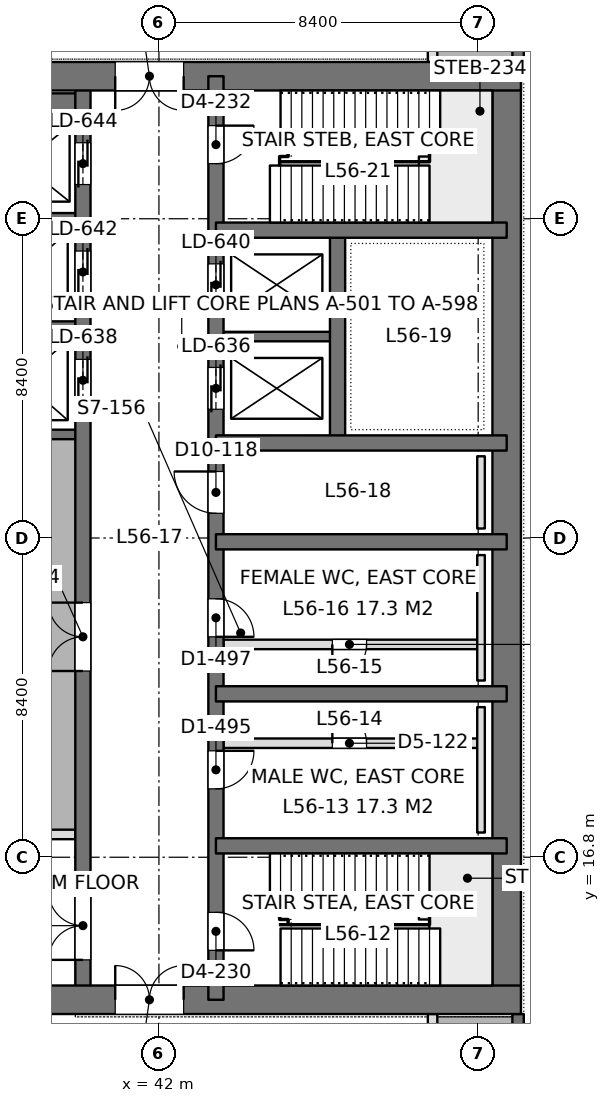
"""IFC4 building model, lengths in metres.
Left out: names, types, materials, properties, quantities, classifications, styles, units other than length and angle.
Written with IfcOpenShell. Run it as: python <this file> out.ifc"""

import sys

from ifc_helpers import new_model, si_unit, direction, frame, frame_2d, origin, place, context, subcontext, project, spatial, rectangle, extrude, element, fill, save


model = new_model("IFC4")
c1 = context("Model", 3, precision=1e-05, world=origin(), true_north=direction((0.0, 1.0)))
c2 = subcontext(c1, "Body", "Model", "MODEL_VIEW")
j1 = project(units=[si_unit("LENGTHUNIT", "METRE"), si_unit("PLANEANGLEUNIT", "RADIAN")], contexts=[c1])
p1 = place(None, origin())
s1 = spatial("IfcSite", under=j1, at=p1, CompositionType="ELEMENT")
p2 = place(p1, origin())
s2 = spatial("IfcBuilding", under=s1, at=p2, CompositionType="ELEMENT")
p3 = place(p2, frame((0.0, 0.0, 244.8)))
s3 = spatial("IfcBuildingStorey", under=s2, at=p3, CompositionType="ELEMENT", Elevation=244.8)
p4 = place(p3, frame((33.675, 13.05, 0.0), z_axis=(0.0, 0.0, 1.0), x_axis=(1.0, 0.0, 0.0)))
e1 = element("IfcWall", 1, at=p4, inside=s3, PredefinedType="SHEAR", context=c2, shape_type="SweptSolid", body=[
    extrude(rectangle(XDim=17.85, YDim=0.75, at=frame_2d((8.925, 0.0))), origin(), (0.0, 0.0, 1.0), 5.4),
])
p5 = place(p4, frame((7.175, 0.0, 0.0)))
e2 = element("IfcOpeningElement", 2, at=p5, cuts=e1, PredefinedType="OPENING", context=c2, shape_type="SweptSolid", body=[
    extrude(rectangle(XDim=1.8, YDim=2.4, at=frame_2d((0.9, 1.2))), frame((0.0, 0.385, 0.0), z_axis=(0.0, -1.0, 0.0), x_axis=(1.0, 0.0, 0.0)), (0.0, 0.0, 1.0), 0.77),
])
p6 = place(p3, frame((33.675, 37.35, 0.0), z_axis=(0.0, 0.0, 1.0), x_axis=(1.0, 0.0, 0.0)))
e3 = element("IfcWall", 3, at=p6, inside=s3, PredefinedType="SHEAR", context=c2, shape_type="SweptSolid", body=[
    extrude(rectangle(XDim=17.85, YDim=0.75, at=frame_2d((8.925, 0.0))), origin(), (0.0, 0.0, 1.0), 5.4),
])
p7 = place(p6, frame((7.175, 0.0, 0.0)))
e4 = element("IfcOpeningElement", 4, at=p7, cuts=e3, PredefinedType="OPENING", context=c2, shape_type="SweptSolid", body=[
    extrude(rectangle(XDim=1.8, YDim=2.4, at=frame_2d((0.9, 1.2))), frame((0.0, 0.385, 0.0), z_axis=(0.0, -1.0, 0.0), x_axis=(1.0, 0.0, 0.0)), (0.0, 0.0, 1.0), 0.77),
])
p8 = place(p3, frame((51.15, 13.05, 0.0), z_axis=(0.0, 0.0, 1.0), x_axis=(0.0, 1.0, 0.0)))
e5 = element("IfcWall", 5, at=p8, inside=s3, PredefinedType="SHEAR", context=c2, shape_type="SweptSolid", body=[
    extrude(rectangle(XDim=24.3, YDim=0.75, at=frame_2d((12.15, 0.0))), origin(), (0.0, 0.0, 1.0), 5.4),
])
p9 = place(p3, frame((43.5, 13.05, 0.0), z_axis=(0.0, 0.0, 1.0), x_axis=(0.0, 1.0, 0.0)))
e6 = element("IfcWall", 6, at=p9, inside=s3, PredefinedType="SHEAR", context=c2, shape_type="SweptSolid", body=[
    extrude(rectangle(XDim=24.3, YDim=0.4, at=frame_2d((12.15, 0.0))), origin(), (0.0, 0.0, 1.0), 5.4),
])
p10 = place(p9, frame((1.3, 0.0, 0.0)))
e7 = element("IfcOpeningElement", 7, at=p10, cuts=e6, PredefinedType="OPENING", context=c2, shape_type="SweptSolid", body=[
    extrude(rectangle(XDim=1.0, YDim=2.2, at=frame_2d((0.5, 1.1))), frame((0.0, 0.21, 0.0), z_axis=(0.0, -1.0, 0.0), x_axis=(1.0, 0.0, 0.0)), (0.0, 0.0, 1.0), 0.42),
])
p11 = place(p9, frame((22.0, 0.0, 0.0)))
e8 = element("IfcOpeningElement", 8, at=p11, cuts=e6, PredefinedType="OPENING", context=c2, shape_type="SweptSolid", body=[
    extrude(rectangle(XDim=1.0, YDim=2.2, at=frame_2d((0.5, 1.1))), frame((0.0, 0.21, 0.0), z_axis=(0.0, -1.0, 0.0), x_axis=(1.0, 0.0, 0.0)), (0.0, 0.0, 1.0), 0.42),
])
p12 = place(p9, frame((5.55, 0.0, 0.0)))
e9 = element("IfcOpeningElement", 9, at=p12, cuts=e6, PredefinedType="OPENING", context=c2, shape_type="SweptSolid", body=[
    extrude(rectangle(XDim=1.0, YDim=2.2, at=frame_2d((0.5, 1.1))), frame((0.0, 0.21, 0.0), z_axis=(0.0, -1.0, 0.0), x_axis=(1.0, 0.0, 0.0)), (0.0, 0.0, 1.0), 0.42),
])
p13 = place(p9, frame((9.55, 0.0, 0.0)))
e10 = element("IfcOpeningElement", 10, at=p13, cuts=e6, PredefinedType="OPENING", context=c2, shape_type="SweptSolid", body=[
    extrude(rectangle(XDim=1.0, YDim=2.2, at=frame_2d((0.5, 1.1))), frame((0.0, 0.21, 0.0), z_axis=(0.0, -1.0, 0.0), x_axis=(1.0, 0.0, 0.0)), (0.0, 0.0, 1.0), 0.42),
])
p14 = place(p9, frame((12.8, 0.0, 0.0)))
e11 = element("IfcOpeningElement", 11, at=p14, cuts=e6, PredefinedType="OPENING", context=c2, shape_type="SweptSolid", body=[
    extrude(rectangle(XDim=1.1, YDim=2.2, at=frame_2d((0.55, 1.1))), frame((0.0, 0.21, 0.0), z_axis=(0.0, -1.0, 0.0), x_axis=(1.0, 0.0, 0.0)), (0.0, 0.0, 1.0), 0.42),
])
p15 = place(p9, frame((15.538, 0.0, 0.0)))
e12 = element("IfcOpeningElement", 12, at=p15, cuts=e6, PredefinedType="OPENING", context=c2, shape_type="SweptSolid", body=[
    extrude(rectangle(XDim=1.1, YDim=2.2, at=frame_2d((0.55, 1.1))), frame((0.0, 0.21, 0.0), z_axis=(0.0, -1.0, 0.0), x_axis=(1.0, 0.0, 0.0)), (0.0, 0.0, 1.0), 0.42),
])
p16 = place(p9, frame((18.262, 0.0, 0.0)))
e13 = element("IfcOpeningElement", 13, at=p16, cuts=e6, PredefinedType="OPENING", context=c2, shape_type="SweptSolid", body=[
    extrude(rectangle(XDim=1.1, YDim=2.2, at=frame_2d((0.55, 1.1))), frame((0.0, 0.21, 0.0), z_axis=(0.0, -1.0, 0.0), x_axis=(1.0, 0.0, 0.0)), (0.0, 0.0, 1.0), 0.42),
])
p17 = place(p3, frame((40.0, 13.05, 0.0), z_axis=(0.0, 0.0, 1.0), x_axis=(0.0, 1.0, 0.0)))
e14 = element("IfcWall", 14, at=p17, inside=s3, PredefinedType="SHEAR", context=c2, shape_type="SweptSolid", body=[
    extrude(rectangle(XDim=24.3, YDim=0.4, at=frame_2d((12.15, 0.0))), origin(), (0.0, 0.0, 1.0), 5.4),
])
p18 = place(p17, frame((15.75, 0.0, 0.0)))
e15 = element("IfcOpeningElement", 15, at=p18, cuts=e14, PredefinedType="OPENING", context=c2, shape_type="SweptSolid", body=[
    extrude(rectangle(XDim=1.1, YDim=2.2, at=frame_2d((0.55, 1.1))), frame((0.0, 0.21, 0.0), z_axis=(0.0, -1.0, 0.0), x_axis=(1.0, 0.0, 0.0)), (0.0, 0.0, 1.0), 0.42),
])
p19 = place(p17, frame((18.6, 0.0, 0.0)))
e16 = element("IfcOpeningElement", 16, at=p19, cuts=e14, PredefinedType="OPENING", context=c2, shape_type="SweptSolid", body=[
    extrude(rectangle(XDim=1.1, YDim=2.2, at=frame_2d((0.55, 1.1))), frame((0.0, 0.21, 0.0), z_axis=(0.0, -1.0, 0.0), x_axis=(1.0, 0.0, 0.0)), (0.0, 0.0, 1.0), 0.42),
])
p20 = place(p17, frame((21.45, 0.0, 0.0)))
e17 = element("IfcOpeningElement", 17, at=p20, cuts=e14, PredefinedType="OPENING", context=c2, shape_type="SweptSolid", body=[
    extrude(rectangle(XDim=1.1, YDim=2.2, at=frame_2d((0.55, 1.1))), frame((0.0, 0.21, 0.0), z_axis=(0.0, -1.0, 0.0), x_axis=(1.0, 0.0, 0.0)), (0.0, 0.0, 1.0), 0.42),
])
p21 = place(p17, frame((8.65, 0.0, 0.0)))
e18 = element("IfcOpeningElement", 18, at=p21, cuts=e14, PredefinedType="OPENING", context=c2, shape_type="SweptSolid", body=[
    extrude(rectangle(XDim=1.8, YDim=2.4, at=frame_2d((0.9, 1.2))), frame((0.0, 0.21, 0.0), z_axis=(0.0, -1.0, 0.0), x_axis=(1.0, 0.0, 0.0)), (0.0, 0.0, 1.0), 0.42),
])
p22 = place(p17, frame((1.05, 0.0, 0.0)))
e19 = element("IfcOpeningElement", 19, at=p22, cuts=e14, PredefinedType="OPENING", context=c2, shape_type="SweptSolid", body=[
    extrude(rectangle(XDim=1.8, YDim=2.4, at=frame_2d((0.9, 1.2))), frame((0.0, 0.21, 0.0), z_axis=(0.0, -1.0, 0.0), x_axis=(1.0, 0.0, 0.0)), (0.0, 0.0, 1.0), 0.42),
])
for number, where, z_axis, x_axis in (
    (20, (51.15, 17.1, 0.0), (0.0, 0.0, 1.0), (-1.0, 0.0, 0.0)),
    (21, (51.15, 21.1, 0.0), (0.0, 0.0, 1.0), (-1.0, 0.0, 0.0)),
    (22, (51.15, 25.1, 0.0), (0.0, 0.0, 1.0), (-1.0, 0.0, 0.0)),
    (23, (51.15, 27.7, 0.0), (0.0, 0.0, 1.0), (-1.0, 0.0, 0.0)),
    (24, (51.15, 33.3, 0.0), (0.0, 0.0, 1.0), (-1.0, 0.0, 0.0)),
):
    element("IfcWall", number, at=place(p3, frame(where, z_axis=z_axis, x_axis=x_axis)), inside=s3, PredefinedType="SHEAR", context=c2, shape_type="SweptSolid", body=[
        extrude(rectangle(XDim=7.65, YDim=0.4, at=frame_2d((3.825, 0.0))), origin(), (0.0, 0.0, 1.0), 5.4),
    ])
p23 = place(p3, frame((46.7, 27.7, 0.0), z_axis=(0.0, 0.0, 1.0), x_axis=(0.0, 1.0, 0.0)))
e25 = element("IfcWall", 25, at=p23, inside=s3, PredefinedType="SHEAR", context=c2, shape_type="SweptSolid", body=[
    extrude(rectangle(XDim=5.6, YDim=0.4, at=frame_2d((2.8, 0.0))), origin(), (0.0, 0.0, 1.0), 5.4),
])
p24 = place(p3, frame((46.7, 30.5, 0.0), z_axis=(0.0, 0.0, 1.0), x_axis=(-1.0, 0.0, 0.0)))
e26 = element("IfcWall", 26, at=p24, inside=s3, PredefinedType="SHEAR", context=c2, shape_type="SweptSolid", body=[
    extrude(rectangle(XDim=3.2, YDim=0.25, at=frame_2d((1.6, 0.0))), origin(), (0.0, 0.0, 1.0), 5.4),
])
p25 = place(p3, frame((40.0, 27.925, 0.0), z_axis=(0.0, 0.0, 1.0), x_axis=(-1.0, 0.0, 0.0)))
e27 = element("IfcWall", 27, at=p25, inside=s3, PredefinedType="SHEAR", context=c2, shape_type="SweptSolid", body=[
    extrude(rectangle(XDim=5.95, YDim=0.25, at=frame_2d((2.975, 0.0))), origin(), (0.0, 0.0, 1.0), 5.4),
])
for number, where, z_axis, x_axis in (
    (28, (40.0, 30.775, 0.0), (0.0, 0.0, 1.0), (-1.0, 0.0, 0.0)),
    (29, (40.0, 33.625, 0.0), (0.0, 0.0, 1.0), (-1.0, 0.0, 0.0)),
):
    element("IfcWall", number, at=place(p3, frame(where, z_axis=z_axis, x_axis=x_axis)), inside=s3, PredefinedType="SHEAR", context=c2, shape_type="SweptSolid", body=[
        extrude(rectangle(XDim=3.2, YDim=0.25, at=frame_2d((1.6, 0.0))), origin(), (0.0, 0.0, 1.0), 5.4),
    ])
p26 = place(p3, frame((40.0, 36.625, 0.0), z_axis=(0.0, 0.0, 1.0), x_axis=(-1.0, 0.0, 0.0)))
e30 = element("IfcWall", 30, at=p26, inside=s3, PredefinedType="SHEAR", context=c2, shape_type="SweptSolid", body=[
    extrude(rectangle(XDim=3.2, YDim=0.55, at=frame_2d((1.6, 0.0))), origin(), (0.0, 0.0, 1.0), 5.4),
])
p27 = place(p3, frame((51.45, 42.0, 0.0), z_axis=(0.0, 0.0, 1.0), x_axis=(0.0, -1.0, 0.0)))
e31 = element("IfcWall", 31, at=p27, inside=s3, PredefinedType="SOLIDWALL", context=c2, shape_type="SweptSolid", body=[
    extrude(rectangle(XDim=4.275, YDim=0.3, at=frame_2d((2.137, 0.0))), origin(), (0.0, 0.0, 1.0), 5.25),
])
p28 = place(p27, frame((0.938, 0.0, 1.2)))
e32 = element("IfcOpeningElement", 32, at=p28, cuts=e31, PredefinedType="OPENING", context=c2, shape_type="SweptSolid", body=[
    extrude(rectangle(XDim=2.4, YDim=2.4, at=frame_2d((1.2, 1.2))), frame((0.0, 0.16, 0.0), z_axis=(0.0, -1.0, 0.0), x_axis=(1.0, 0.0, 0.0)), (0.0, 0.0, 1.0), 0.32),
])
p29 = place(p3, frame((51.45, 12.675, 0.0), z_axis=(0.0, 0.0, 1.0), x_axis=(0.0, -1.0, 0.0)))
e33 = element("IfcWall", 33, at=p29, inside=s3, PredefinedType="SOLIDWALL", context=c2, shape_type="SweptSolid", body=[
    extrude(rectangle(XDim=4.275, YDim=0.3, at=frame_2d((2.138, 0.0))), origin(), (0.0, 0.0, 1.0), 5.25),
])
p30 = place(p29, frame((0.938, 0.0, 1.2)))
e34 = element("IfcOpeningElement", 34, at=p30, cuts=e33, PredefinedType="OPENING", context=c2, shape_type="SweptSolid", body=[
    extrude(rectangle(XDim=2.4, YDim=2.4, at=frame_2d((1.2, 1.2))), frame((0.0, 0.16, 0.0), z_axis=(0.0, -1.0, 0.0), x_axis=(1.0, 0.0, 0.0)), (0.0, 0.0, 1.0), 0.32),
])
p31 = place(p3, frame((33.898, 17.4, 0.0), z_axis=(0.0, 0.0, 1.0), x_axis=(1.0, 0.0, 0.0)))
e35 = element("IfcWall", 35, at=p31, inside=s3, PredefinedType="PARTITIONING", context=c2, shape_type="SweptSolid", body=[
    extrude(rectangle(XDim=5.904, YDim=0.25, at=frame_2d((2.952, 0.0))), origin(), (0.0, 0.0, 1.0), 4.7),
])
for number, where, z_axis, x_axis in (
    (36, (49.2, 10.8, 0.0), (0.0, 0.0, 1.0), (0.0, 1.0, 0.0)),
    (37, (49.2, 37.724, 0.0), (0.0, 0.0, 1.0), (0.0, 1.0, 0.0)),
):
    element("IfcWall", number, at=place(p3, frame(where, z_axis=z_axis, x_axis=x_axis)), inside=s3, PredefinedType="PARTITIONING", context=c2, shape_type="SweptSolid", body=[
        extrude(rectangle(XDim=1.876, YDim=0.25, at=frame_2d((0.938, 0.0))), origin(), (0.0, 0.0, 1.0), 5.25),
    ])
p32 = place(p3, frame((43.7, 22.4, 0.0), z_axis=(0.0, 0.0, 1.0), x_axis=(1.0, 0.0, 0.0)))
e38 = element("IfcWall", 38, at=p32, inside=s3, PredefinedType="PARTITIONING", context=c2, shape_type="SweptSolid", body=[
    extrude(rectangle(XDim=6.675, YDim=0.25, at=frame_2d((3.337, 0.0))), origin(), (0.0, 0.0, 1.0), 5.2),
])
p33 = place(p32, frame((2.863, 0.0, 0.0)))
e39 = element("IfcOpeningElement", 39, at=p33, cuts=e38, PredefinedType="OPENING", context=c2, shape_type="SweptSolid", body=[
    extrude(rectangle(XDim=0.9, YDim=2.2, at=frame_2d((0.45, 1.1))), frame((0.0, 0.135, 0.0), z_axis=(0.0, -1.0, 0.0), x_axis=(1.0, 0.0, 0.0)), (0.0, 0.0, 1.0), 0.27),
])
p34 = place(p3, frame((43.7, 19.8, 0.0), z_axis=(0.0, 0.0, 1.0), x_axis=(1.0, 0.0, 0.0)))
e40 = element("IfcWall", 40, at=p34, inside=s3, PredefinedType="PARTITIONING", context=c2, shape_type="SweptSolid", body=[
    extrude(rectangle(XDim=6.675, YDim=0.25, at=frame_2d((3.337, 0.0))), origin(), (0.0, 0.0, 1.0), 5.2),
])
p35 = place(p34, frame((2.863, 0.0, 0.0)))
e41 = element("IfcOpeningElement", 41, at=p35, cuts=e40, PredefinedType="OPENING", context=c2, shape_type="SweptSolid", body=[
    extrude(rectangle(XDim=0.9, YDim=2.2, at=frame_2d((0.45, 1.1))), frame((0.0, 0.135, 0.0), z_axis=(0.0, -1.0, 0.0), x_axis=(1.0, 0.0, 0.0)), (0.0, 0.0, 1.0), 0.27),
])
for number, where, z_axis, x_axis in (
    (42, (50.475, 17.45, 0.0), (0.0, 0.0, 1.0), (0.0, 1.0, 0.0)),
    (43, (50.475, 21.45, 0.0), (0.0, 0.0, 1.0), (0.0, 1.0, 0.0)),
):
    element("IfcWall", number, at=place(p3, frame(where, z_axis=z_axis, x_axis=x_axis)), inside=s3, PredefinedType="PLUMBINGWALL", context=c2, shape_type="SweptSolid", body=[
        extrude(rectangle(XDim=3.3, YDim=0.2, at=frame_2d((1.65, 0.0))), origin(), (0.0, 0.0, 1.0), 1.2),
    ])
p36 = place(p3, frame((50.475, 25.45, 0.0), z_axis=(0.0, 0.0, 1.0), x_axis=(0.0, 1.0, 0.0)))
e44 = element("IfcWall", 44, at=p36, inside=s3, PredefinedType="PLUMBINGWALL", context=c2, shape_type="SweptSolid", body=[
    extrude(rectangle(XDim=1.9, YDim=0.2, at=frame_2d((0.95, 0.0))), origin(), (0.0, 0.0, 1.0), 1.2),
])
p37 = place(p5, origin())
e45 = element("IfcDoor", 45, at=p37, inside=s3, OperationType="DOUBLE_DOOR_SINGLE_SWING", PredefinedType="DOOR", context=c2, shape_type="SweptSolid", body=[
    extrude(rectangle(XDim=1.8, YDim=2.4, at=frame_2d((0.9, 1.2))), frame((0.0, 0.025, 0.0), z_axis=(0.0, -1.0, 0.0), x_axis=(1.0, 0.0, 0.0)), (0.0, 0.0, 1.0), 0.05),
])
fill(e2, e45)
p38 = place(p7, frame((1.8, 0.0, 0.0), z_axis=(0.0, 0.0, 1.0), x_axis=(-1.0, 0.0, 0.0)))
e46 = element("IfcDoor", 46, at=p38, inside=s3, OperationType="DOUBLE_DOOR_SINGLE_SWING", PredefinedType="DOOR", context=c2, shape_type="SweptSolid", body=[
    extrude(rectangle(XDim=1.8, YDim=2.4, at=frame_2d((0.9, 1.2))), frame((0.0, 0.025, 0.0), z_axis=(0.0, -1.0, 0.0), x_axis=(1.0, 0.0, 0.0)), (0.0, 0.0, 1.0), 0.05),
])
fill(e4, e46)
p39 = place(p10, frame((1.0, 0.0, 0.0), z_axis=(0.0, 0.0, 1.0), x_axis=(-1.0, 0.0, 0.0)))
e47 = element("IfcDoor", 47, at=p39, inside=s3, OperationType="SINGLE_SWING_RIGHT", PredefinedType="DOOR", context=c2, shape_type="SweptSolid", body=[
    extrude(rectangle(XDim=1.0, YDim=2.2, at=frame_2d((0.5, 1.1))), frame((0.0, 0.025, 0.0), z_axis=(0.0, -1.0, 0.0), x_axis=(1.0, 0.0, 0.0)), (0.0, 0.0, 1.0), 0.05),
])
fill(e7, e47)
p40 = place(p11, frame((1.0, 0.0, 0.0), z_axis=(0.0, 0.0, 1.0), x_axis=(-1.0, 0.0, 0.0)))
e48 = element("IfcDoor", 48, at=p40, inside=s3, OperationType="SINGLE_SWING_LEFT", PredefinedType="DOOR", context=c2, shape_type="SweptSolid", body=[
    extrude(rectangle(XDim=1.0, YDim=2.2, at=frame_2d((0.5, 1.1))), frame((0.0, 0.025, 0.0), z_axis=(0.0, -1.0, 0.0), x_axis=(1.0, 0.0, 0.0)), (0.0, 0.0, 1.0), 0.05),
])
fill(e8, e48)
p41 = place(p12, frame((1.0, 0.0, 0.0), z_axis=(0.0, 0.0, 1.0), x_axis=(-1.0, 0.0, 0.0)))
e49 = element("IfcDoor", 49, at=p41, inside=s3, OperationType="SINGLE_SWING_LEFT", PredefinedType="DOOR", context=c2, shape_type="SweptSolid", body=[
    extrude(rectangle(XDim=1.0, YDim=2.2, at=frame_2d((0.5, 1.1))), frame((0.0, 0.025, 0.0), z_axis=(0.0, -1.0, 0.0), x_axis=(1.0, 0.0, 0.0)), (0.0, 0.0, 1.0), 0.05),
])
fill(e9, e49)
p42 = place(p13, frame((1.0, 0.0, 0.0), z_axis=(0.0, 0.0, 1.0), x_axis=(-1.0, 0.0, 0.0)))
e50 = element("IfcDoor", 50, at=p42, inside=s3, OperationType="SINGLE_SWING_RIGHT", PredefinedType="DOOR", context=c2, shape_type="SweptSolid", body=[
    extrude(rectangle(XDim=1.0, YDim=2.2, at=frame_2d((0.5, 1.1))), frame((0.0, 0.025, 0.0), z_axis=(0.0, -1.0, 0.0), x_axis=(1.0, 0.0, 0.0)), (0.0, 0.0, 1.0), 0.05),
])
fill(e10, e50)
p43 = place(p14, origin())
e51 = element("IfcDoor", 51, at=p43, inside=s3, OperationType="SINGLE_SWING_RIGHT", PredefinedType="DOOR", context=c2, shape_type="SweptSolid", body=[
    extrude(rectangle(XDim=1.1, YDim=2.2, at=frame_2d((0.55, 1.1))), frame((0.0, 0.025, 0.0), z_axis=(0.0, -1.0, 0.0), x_axis=(1.0, 0.0, 0.0)), (0.0, 0.0, 1.0), 0.05),
])
fill(e11, e51)
p44 = place(p18, origin())
e52 = element("IfcDoor", 52, at=p44, inside=s3, OperationType="DOUBLE_DOOR_SLIDING", PredefinedType="DOOR", context=c2, shape_type="SweptSolid", body=[
    extrude(rectangle(XDim=1.1, YDim=2.2, at=frame_2d((0.55, 1.1))), frame((0.0, 0.025, 0.0), z_axis=(0.0, -1.0, 0.0), x_axis=(1.0, 0.0, 0.0)), (0.0, 0.0, 1.0), 0.05),
])
fill(e15, e52)
p45 = place(p19, origin())
e53 = element("IfcDoor", 53, at=p45, inside=s3, OperationType="DOUBLE_DOOR_SLIDING", PredefinedType="DOOR", context=c2, shape_type="SweptSolid", body=[
    extrude(rectangle(XDim=1.1, YDim=2.2, at=frame_2d((0.55, 1.1))), frame((0.0, 0.025, 0.0), z_axis=(0.0, -1.0, 0.0), x_axis=(1.0, 0.0, 0.0)), (0.0, 0.0, 1.0), 0.05),
])
fill(e16, e53)
p46 = place(p20, origin())
e54 = element("IfcDoor", 54, at=p46, inside=s3, OperationType="DOUBLE_DOOR_SLIDING", PredefinedType="DOOR", context=c2, shape_type="SweptSolid", body=[
    extrude(rectangle(XDim=1.1, YDim=2.2, at=frame_2d((0.55, 1.1))), frame((0.0, 0.025, 0.0), z_axis=(0.0, -1.0, 0.0), x_axis=(1.0, 0.0, 0.0)), (0.0, 0.0, 1.0), 0.05),
])
fill(e17, e54)
p47 = place(p15, origin())
e55 = element("IfcDoor", 55, at=p47, inside=s3, OperationType="DOUBLE_DOOR_SLIDING", PredefinedType="DOOR", context=c2, shape_type="SweptSolid", body=[
    extrude(rectangle(XDim=1.1, YDim=2.2, at=frame_2d((0.55, 1.1))), frame((0.0, 0.025, 0.0), z_axis=(0.0, -1.0, 0.0), x_axis=(1.0, 0.0, 0.0)), (0.0, 0.0, 1.0), 0.05),
])
fill(e12, e55)
p48 = place(p16, origin())
e56 = element("IfcDoor", 56, at=p48, inside=s3, OperationType="DOUBLE_DOOR_SLIDING", PredefinedType="DOOR", context=c2, shape_type="SweptSolid", body=[
    extrude(rectangle(XDim=1.1, YDim=2.2, at=frame_2d((0.55, 1.1))), frame((0.0, 0.025, 0.0), z_axis=(0.0, -1.0, 0.0), x_axis=(1.0, 0.0, 0.0)), (0.0, 0.0, 1.0), 0.05),
])
fill(e13, e56)
p49 = place(p21, origin())
e57 = element("IfcDoor", 57, at=p49, inside=s3, OperationType="DOUBLE_DOOR_SINGLE_SWING", PredefinedType="DOOR", context=c2, shape_type="SweptSolid", body=[
    extrude(rectangle(XDim=1.8, YDim=2.4, at=frame_2d((0.9, 1.2))), frame((0.0, 0.025, 0.0), z_axis=(0.0, -1.0, 0.0), x_axis=(1.0, 0.0, 0.0)), (0.0, 0.0, 1.0), 0.05),
])
fill(e18, e57)
p50 = place(p22, origin())
e58 = element("IfcDoor", 58, at=p50, inside=s3, OperationType="DOUBLE_DOOR_SINGLE_SWING", PredefinedType="DOOR", context=c2, shape_type="SweptSolid", body=[
    extrude(rectangle(XDim=1.8, YDim=2.4, at=frame_2d((0.9, 1.2))), frame((0.0, 0.025, 0.0), z_axis=(0.0, -1.0, 0.0), x_axis=(1.0, 0.0, 0.0)), (0.0, 0.0, 1.0), 0.05),
])
fill(e19, e58)
p51 = place(p33, frame((0.9, 0.0, 0.0), z_axis=(0.0, 0.0, 1.0), x_axis=(-1.0, 0.0, 0.0)))
e59 = element("IfcDoor", 59, at=p51, inside=s3, OperationType="SINGLE_SWING_RIGHT", PredefinedType="DOOR", context=c2, shape_type="SweptSolid", body=[
    extrude(rectangle(XDim=0.9, YDim=2.2, at=frame_2d((0.45, 1.1))), frame((0.0, 0.025, 0.0), z_axis=(0.0, -1.0, 0.0), x_axis=(1.0, 0.0, 0.0)), (0.0, 0.0, 1.0), 0.05),
])
fill(e39, e59)
p52 = place(p35, origin())
e60 = element("IfcDoor", 60, at=p52, inside=s3, OperationType="SINGLE_SWING_LEFT", PredefinedType="DOOR", context=c2, shape_type="SweptSolid", body=[
    extrude(rectangle(XDim=0.9, YDim=2.2, at=frame_2d((0.45, 1.1))), frame((0.0, 0.025, 0.0), z_axis=(0.0, -1.0, 0.0), x_axis=(1.0, 0.0, 0.0)), (0.0, 0.0, 1.0), 0.05),
])
fill(e41, e60)
save(model, sys.argv[1])
